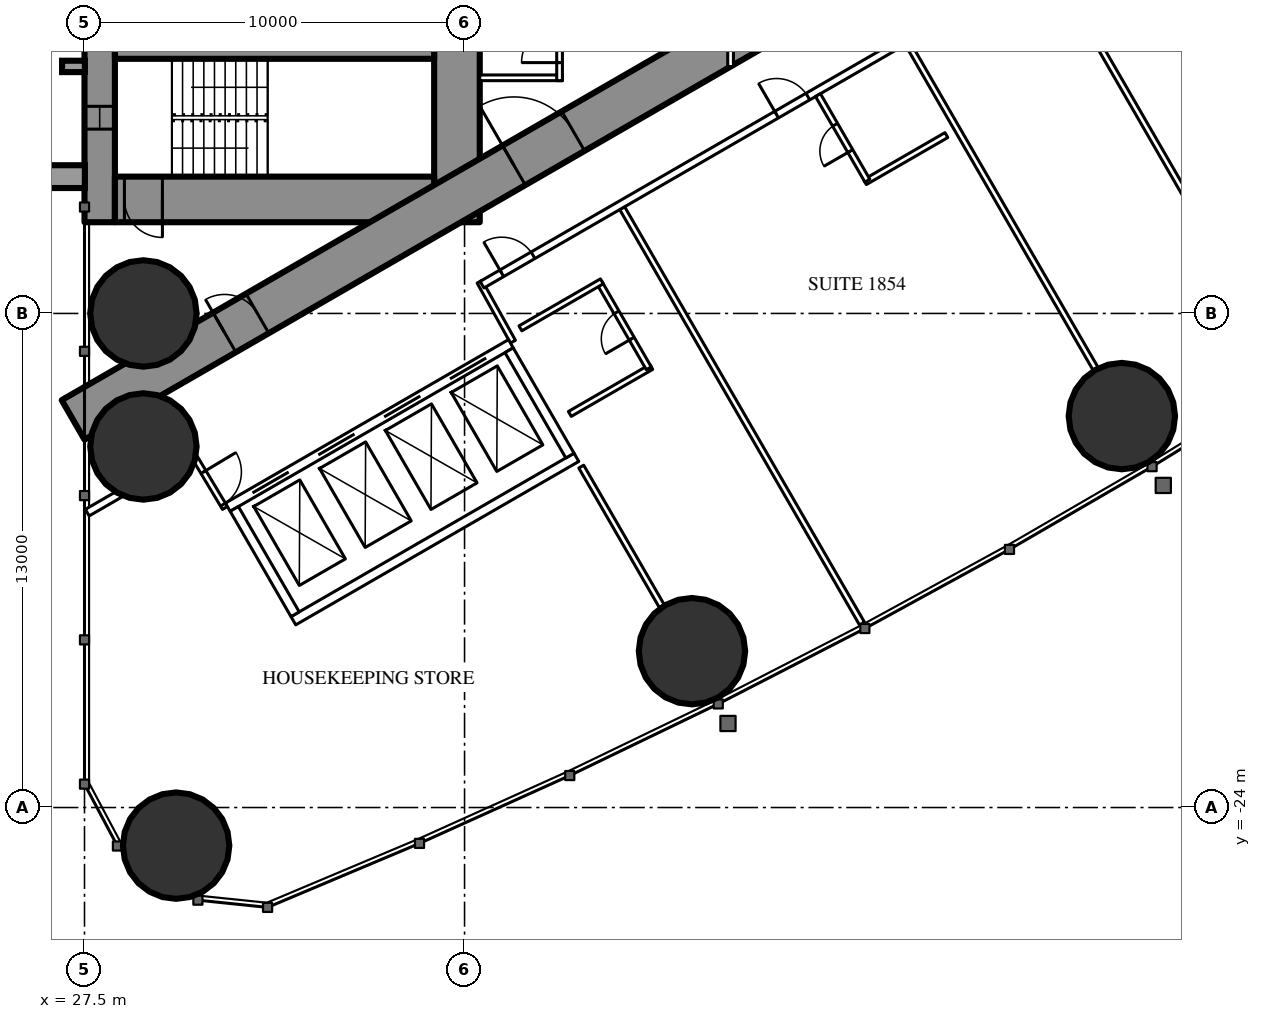
"""IFC4 building model, lengths in metres.
Left out: names, types, materials, properties, quantities, classifications, styles, units other than length and angle.
Written with IfcOpenShell. Run it as: python <this file> out.ifc"""

import sys

from ifc_helpers import new_model, si_unit, direction, frame, frame_2d, origin, origin_2d, place, context, subcontext, project, spatial, rectangle, hollow_circle, extrude, element, fill, save


model = new_model("IFC4")
c1 = context("Model", 3, precision=1e-05, world=origin(), true_north=direction((0.0, 1.0)))
c2 = subcontext(c1, "Body", "Model", "MODEL_VIEW")
j1 = project(units=[si_unit("LENGTHUNIT", "METRE"), si_unit("PLANEANGLEUNIT", "RADIAN")], contexts=[c1])
p1 = place(None, origin())
s1 = spatial("IfcSite", under=j1, at=p1, CompositionType="ELEMENT")
p2 = place(p1, origin())
s2 = spatial("IfcBuilding", under=s1, at=p2, CompositionType="ELEMENT")
p3 = place(p2, frame((0.0, 0.0, 70.5)))
s3 = spatial("IfcBuildingStorey", under=s2, at=p3, CompositionType="ELEMENT", Elevation=70.5)
for number, where, z_axis, x_axis in (
    (1, (29.911, -25.002, 0.0), (0.0, 0.0, 1.0), (1.0, 0.0, 0.0)),
    (2, (29.05, -11.0, 0.0), (0.0, 0.0, 1.0), (1.0, 0.0, 0.0)),
    (3, (29.05, -14.5, 0.0), (0.0, 0.0, 1.0), (1.0, 0.0, 0.0)),
    (4, (43.484, -19.886, 0.0), (0.0, 0.0, 1.0), (1.0, 0.0, 0.0)),
    (5, (54.795, -13.701, 0.0), (0.0, 0.0, 1.0), (1.0, 0.0, 0.0)),
):
    element("IfcColumn", number, at=place(p3, frame(where, z_axis=z_axis, x_axis=x_axis)), inside=s3, PredefinedType="COLUMN", context=c2, shape_type="SweptSolid", body=[
        extrude(hollow_circle(Radius=1.4, WallThickness=0.12, at=origin_2d()), origin(), (0.0, 0.0, 1.0), 3.5),
    ])
p4 = place(p3, frame((27.9, -8.6, 0.0), z_axis=(0.0, 0.0, 1.0), x_axis=(0.0, 1.0, 0.0)))
e6 = element("IfcWall", 6, at=p4, inside=s3, PredefinedType="SHEAR", context=c2, shape_type="SweptSolid", body=[
    extrude(rectangle(XDim=17.2, YDim=0.8, at=frame_2d((8.6, 0.0))), origin(), (0.0, 0.0, 1.0), 3.5),
])
p5 = place(p4, frame((2.45, 0.0, 0.6)))
e7 = element("IfcOpeningElement", 7, at=p5, cuts=e6, PredefinedType="OPENING", context=c2, shape_type="SweptSolid", body=[
    extrude(rectangle(XDim=0.6, YDim=2.1, at=frame_2d((0.3, 1.05))), frame((0.0, 0.41, 0.0), z_axis=(0.0, -1.0, 0.0), x_axis=(1.0, 0.0, 0.0)), (0.0, 0.0, 1.0), 0.82),
])
p6 = place(p4, frame((14.15, 0.0, 0.6)))
e8 = element("IfcOpeningElement", 8, at=p6, cuts=e6, PredefinedType="OPENING", context=c2, shape_type="SweptSolid", body=[
    extrude(rectangle(XDim=0.6, YDim=2.1, at=frame_2d((0.3, 1.05))), frame((0.0, 0.41, 0.0), z_axis=(0.0, -1.0, 0.0), x_axis=(1.0, 0.0, 0.0)), (0.0, 0.0, 1.0), 0.82),
])
p7 = place(p3, frame((37.3, -8.6, 0.0), z_axis=(0.0, 0.0, 1.0), x_axis=(0.0, 1.0, 0.0)))
e9 = element("IfcWall", 9, at=p7, inside=s3, PredefinedType="SHEAR", context=c2, shape_type="SweptSolid", body=[
    extrude(rectangle(XDim=17.2, YDim=1.2, at=frame_2d((8.6, 0.0))), origin(), (0.0, 0.0, 1.0), 3.5),
])
p8 = place(p7, frame((7.7, 0.0, 0.0)))
e10 = element("IfcOpeningElement", 10, at=p8, cuts=e9, PredefinedType="OPENING", context=c2, shape_type="SweptSolid", body=[
    extrude(rectangle(XDim=1.8, YDim=2.2, at=frame_2d((0.9, 1.1))), frame((0.0, 0.61, 0.0), z_axis=(0.0, -1.0, 0.0), x_axis=(1.0, 0.0, 0.0)), (0.0, 0.0, 1.0), 1.22),
])
p9 = place(p3, frame((28.3, -8.0, 0.0), z_axis=(0.0, 0.0, 1.0), x_axis=(1.0, 0.0, 0.0)))
e11 = element("IfcWall", 11, at=p9, inside=s3, PredefinedType="SHEAR", context=c2, shape_type="SweptSolid", body=[
    extrude(rectangle(XDim=8.4, YDim=1.2, at=frame_2d((4.2, 0.0))), origin(), (0.0, 0.0, 1.0), 3.5),
])
p10 = place(p9, frame((0.25, 0.0, 0.0)))
e12 = element("IfcOpeningElement", 12, at=p10, cuts=e11, PredefinedType="OPENING", context=c2, shape_type="SweptSolid", body=[
    extrude(rectangle(XDim=1.0, YDim=2.2, at=frame_2d((0.5, 1.1))), frame((0.0, 0.61, 0.0), z_axis=(0.0, -1.0, 0.0), x_axis=(1.0, 0.0, 0.0)), (0.0, 0.0, 1.0), 1.22),
])
p11 = place(p3, frame((28.3, -4.15, 0.0), z_axis=(0.0, 0.0, 1.0), x_axis=(1.0, 0.0, 0.0)))
e13 = element("IfcWall", 13, at=p11, inside=s3, PredefinedType="SHEAR", context=c2, shape_type="SweptSolid", body=[
    extrude(rectangle(XDim=8.4, YDim=0.3, at=frame_2d((4.2, 0.0))), origin(), (0.0, 0.0, 1.0), 3.5),
])
p12 = place(p3, frame((27.2, -13.8, 0.0), z_axis=(0.0, 0.0, 1.0), x_axis=(0.866027159892, 0.499996958321, 0.0)))
e14 = element("IfcWall", 14, at=p12, inside=s3, PredefinedType="SHEAR", context=c2, shape_type="SweptSolid", body=[
    extrude(rectangle(XDim=27.947, YDim=1.2, at=frame_2d((13.973, 0.0))), origin(), (0.0, 0.0, 1.0), 3.5),
])
p13 = place(p12, frame((4.6, 0.0, 0.0)))
e15 = element("IfcOpeningElement", 15, at=p13, cuts=e14, PredefinedType="OPENING", context=c2, shape_type="SweptSolid", body=[
    extrude(rectangle(XDim=1.0, YDim=2.2, at=frame_2d((0.5, 1.1))), frame((0.0, 0.61, 0.0), z_axis=(0.0, -1.0, 0.0), x_axis=(1.0, 0.0, 0.0)), (0.0, 0.0, 1.0), 1.22),
])
p14 = place(p12, frame((13.395, 0.0, 0.0)))
e16 = element("IfcOpeningElement", 16, at=p14, cuts=e14, PredefinedType="OPENING", context=c2, shape_type="SweptSolid", body=[
    extrude(rectangle(XDim=1.8, YDim=2.2, at=frame_2d((0.9, 1.1))), frame((0.0, 0.61, 0.0), z_axis=(0.0, -1.0, 0.0), x_axis=(1.0, 0.0, 0.0)), (0.0, 0.0, 1.0), 1.22),
])
p15 = place(p3, frame((41.647, -8.23, 0.0), z_axis=(0.0, 0.0, 1.0), x_axis=(0.49998590462, -0.866033541603, 0.0)))
e17 = element("IfcWall", 17, at=p15, inside=s3, PredefinedType="PARTITIONING", context=c2, shape_type="SweptSolid", body=[
    extrude(rectangle(XDim=12.621, YDim=0.15, at=frame_2d((6.311, 0.0))), origin(), (0.0, 0.0, 1.0), 3.25),
])
p16 = place(p3, frame((49.159, -3.893, 0.0), z_axis=(0.0, 0.0, 1.0), x_axis=(0.499998773722, -0.866026111775, 0.0)))
e18 = element("IfcWall", 18, at=p16, inside=s3, PredefinedType="PARTITIONING", context=c2, shape_type="SweptSolid", body=[
    extrude(rectangle(XDim=9.892, YDim=0.15, at=frame_2d((4.946, 0.0))), origin(), (0.0, 0.0, 1.0), 2.25),
])
p17 = place(p3, frame((52.915, -1.725, 0.0), z_axis=(0.0, 0.0, 1.0), x_axis=(0.499997163113, -0.866027041656, 0.0)))
e19 = element("IfcWall", 19, at=p17, inside=s3, PredefinedType="PARTITIONING", context=c2, shape_type="SweptSolid", body=[
    extrude(rectangle(XDim=12.591, YDim=0.15, at=frame_2d((6.295, 0.0))), origin(), (0.0, 0.0, 1.0), 3.25),
])
p18 = place(p3, frame((40.57, -15.03, 0.0), z_axis=(0.0, 0.0, 1.0), x_axis=(0.500012993597, -0.866017901798, 0.0)))
e20 = element("IfcWall", 20, at=p18, inside=s3, PredefinedType="PARTITIONING", context=c2, shape_type="SweptSolid", body=[
    extrude(rectangle(XDim=4.243, YDim=0.15, at=frame_2d((2.122, 0.0))), origin(), (0.0, 0.0, 1.0), 3.25),
])
p19 = place(p3, frame((27.572, -16.241, 0.0), z_axis=(0.0, 0.0, 1.0), x_axis=(0.866029654818, 0.499992636921, 0.0)))
e21 = element("IfcWall", 21, at=p19, inside=s3, PredefinedType="PARTITIONING", context=c2, shape_type="SweptSolid", body=[
    extrude(rectangle(XDim=3.155, YDim=0.2, at=frame_2d((1.577, 0.0))), origin(), (0.0, 0.0, 1.0), 3.25),
])
p20 = place(p3, frame((38.773, -11.742, 0.0), z_axis=(0.0, 0.0, 1.0), x_axis=(-0.485528096672, 0.8742210632, 0.0)))
e22 = element("IfcWall", 22, at=p20, inside=s3, PredefinedType="PARTITIONING", context=c2, shape_type="SweptSolid", body=[
    extrude(rectangle(XDim=1.805, YDim=0.15, at=frame_2d((0.903, 0.0))), origin(), (0.0, 0.0, 1.0), 3.25),
])
p21 = place(p3, frame((30.267, -14.569, 0.0), z_axis=(0.0, 0.0, 1.0), x_axis=(0.514336634837, -0.857588377991, 0.0)))
e23 = element("IfcWall", 23, at=p21, inside=s3, PredefinedType="PARTITIONING", context=c2, shape_type="SweptSolid", body=[
    extrude(rectangle(XDim=1.805, YDim=0.15, at=frame_2d((0.903, 0.0))), origin(), (0.0, 0.0, 1.0), 3.25),
])
p22 = place(p21, frame((0.703, 0.0, 0.0)))
e24 = element("IfcOpeningElement", 24, at=p22, cuts=e23, PredefinedType="OPENING", context=c2, shape_type="SweptSolid", body=[
    extrude(rectangle(XDim=1.0, YDim=2.2, at=frame_2d((0.5, 1.1))), frame((0.0, 0.085, 0.0), z_axis=(0.0, -1.0, 0.0), x_axis=(1.0, 0.0, 0.0)), (0.0, 0.0, 1.0), 0.17),
])
p23 = place(p3, frame((37.96, -10.243, 0.0), z_axis=(0.0, 0.0, 1.0), x_axis=(0.866030548046, 0.499991089772, 0.0)))
e25 = element("IfcWall", 25, at=p23, inside=s3, PredefinedType="PARTITIONING", context=c2, shape_type="SweptSolid", body=[
    extrude(rectangle(XDim=12.849, YDim=0.2, at=frame_2d((6.425, 0.0))), origin(), (0.0, 0.0, 1.0), 3.25),
])
p24 = place(p23, frame((8.949, 0.0, 0.0)))
e26 = element("IfcOpeningElement", 26, at=p24, cuts=e25, PredefinedType="OPENING", context=c2, shape_type="SweptSolid", body=[
    extrude(rectangle(XDim=0.95, YDim=2.2, at=frame_2d((0.475, 1.1))), frame((0.0, 0.11, 0.0), z_axis=(0.0, -1.0, 0.0), x_axis=(1.0, 0.0, 0.0)), (0.0, 0.0, 1.0), 0.22),
])
p25 = place(p23, frame((0.6, 0.0, 0.0)))
e27 = element("IfcOpeningElement", 27, at=p25, cuts=e25, PredefinedType="OPENING", context=c2, shape_type="SweptSolid", body=[
    extrude(rectangle(XDim=0.95, YDim=2.2, at=frame_2d((0.475, 1.1))), frame((0.0, 0.11, 0.0), z_axis=(0.0, -1.0, 0.0), x_axis=(1.0, 0.0, 0.0)), (0.0, 0.0, 1.0), 0.22),
])
p26 = place(p3, frame((48.035, -7.545, 0.0), z_axis=(0.0, 0.0, 1.0), x_axis=(0.866006523861, 0.500032699561, 0.0)))
e28 = element("IfcWall", 28, at=p26, inside=s3, PredefinedType="PARTITIONING", context=c2, shape_type="SweptSolid", body=[
    extrude(rectangle(XDim=2.475, YDim=0.15, at=frame_2d((1.237, 0.0))), origin(), (0.0, 0.0, 1.0), 3.25),
])
p27 = place(p3, frame((46.8, -5.255, 0.0), z_axis=(0.0, 0.0, 1.0), x_axis=(0.500006934395, -0.866021400173, 0.0)))
e29 = element("IfcWall", 29, at=p27, inside=s3, PredefinedType="PARTITIONING", context=c2, shape_type="SweptSolid", body=[
    extrude(rectangle(XDim=2.6, YDim=0.15, at=frame_2d((1.3, 0.0))), origin(), (0.0, 0.0, 1.0), 3.25),
])
p28 = place(p27, frame((0.9, 0.0, 0.0)))
e30 = element("IfcOpeningElement", 30, at=p28, cuts=e29, PredefinedType="OPENING", context=c2, shape_type="SweptSolid", body=[
    extrude(rectangle(XDim=0.8, YDim=2.2, at=frame_2d((0.4, 1.1))), frame((0.0, 0.085, 0.0), z_axis=(0.0, -1.0, 0.0), x_axis=(1.0, 0.0, 0.0)), (0.0, 0.0, 1.0), 0.17),
])
p29 = place(p3, frame((40.27, -13.644, 0.0), z_axis=(0.0, 0.0, 1.0), x_axis=(0.866031185235, 0.4999899861, 0.0)))
e31 = element("IfcWall", 31, at=p29, inside=s3, PredefinedType="PARTITIONING", context=c2, shape_type="SweptSolid", body=[
    extrude(rectangle(XDim=2.475, YDim=0.15, at=frame_2d((1.238, 0.0))), origin(), (0.0, 0.0, 1.0), 3.25),
])
p30 = place(p3, frame((41.048, -10.193, 0.0), z_axis=(0.0, 0.0, 1.0), x_axis=(0.500047596559, -0.865997922154, 0.0)))
e32 = element("IfcWall", 32, at=p30, inside=s3, PredefinedType="PARTITIONING", context=c2, shape_type="SweptSolid", body=[
    extrude(rectangle(XDim=2.6, YDim=0.15, at=frame_2d((1.3, 0.0))), origin(), (0.0, 0.0, 1.0), 3.25),
])
p31 = place(p30, frame((0.9, 0.0, 0.0)))
e33 = element("IfcOpeningElement", 33, at=p31, cuts=e32, PredefinedType="OPENING", context=c2, shape_type="SweptSolid", body=[
    extrude(rectangle(XDim=0.8, YDim=2.2, at=frame_2d((0.4, 1.1))), frame((0.0, 0.085, 0.0), z_axis=(0.0, -1.0, 0.0), x_axis=(1.0, 0.0, 0.0)), (0.0, 0.0, 1.0), 0.17),
])
p32 = place(p3, frame((38.97, -11.393, 0.0), z_axis=(0.0, 0.0, 1.0), x_axis=(0.866031185235, 0.4999899861, 0.0)))
e34 = element("IfcWall", 34, at=p32, inside=s3, PredefinedType="PARTITIONING", context=c2, shape_type="SweptSolid", body=[
    extrude(rectangle(XDim=2.475, YDim=0.15, at=frame_2d((1.238, 0.0))), origin(), (0.0, 0.0, 1.0), 3.25),
])
p33 = place(p3, frame((37.9, -4.8, 0.0), z_axis=(0.0, 0.0, 1.0), x_axis=(1.0, 0.0, 0.0)))
e35 = element("IfcWall", 35, at=p33, inside=s3, PredefinedType="PARTITIONING", context=c2, shape_type="SweptSolid", body=[
    extrude(rectangle(XDim=2.175, YDim=0.15, at=frame_2d((1.087, 0.0))), origin(), (0.0, 0.0, 1.0), 3.25),
])
p34 = place(p3, frame((40.0, -4.875, 0.0), z_axis=(0.0, 0.0, 1.0), x_axis=(0.0, 1.0, 0.0)))
e36 = element("IfcWall", 36, at=p34, inside=s3, PredefinedType="PARTITIONING", context=c2, shape_type="SweptSolid", body=[
    extrude(rectangle(XDim=1.95, YDim=0.15, at=frame_2d((0.975, 0.0))), origin(), (0.0, 0.0, 1.0), 3.25),
])
p35 = place(p34, frame((0.475, 0.0, 0.0)))
e37 = element("IfcOpeningElement", 37, at=p35, cuts=e36, PredefinedType="OPENING", context=c2, shape_type="SweptSolid", body=[
    extrude(rectangle(XDim=1.0, YDim=2.2, at=frame_2d((0.5, 1.1))), frame((0.0, 0.085, 0.0), z_axis=(0.0, -1.0, 0.0), x_axis=(1.0, 0.0, 0.0)), (0.0, 0.0, 1.0), 0.17),
])
p36 = place(p3, frame((44.5, -4.505, 0.0), z_axis=(0.0, 0.0, 1.0), x_axis=(0.0, 1.0, 0.0)))
e38 = element("IfcWall", 38, at=p36, inside=s3, PredefinedType="PARTITIONING", context=c2, shape_type="SweptSolid", body=[
    extrude(rectangle(XDim=9.009, YDim=0.15, at=frame_2d((4.505, 0.0))), origin(), (0.0, 0.0, 1.0), 2.45),
])
p37 = place(p36, frame((1.752, 0.0, 0.0)))
e39 = element("IfcOpeningElement", 39, at=p37, cuts=e38, PredefinedType="OPENING", context=c2, shape_type="SweptSolid", body=[
    extrude(rectangle(XDim=1.0, YDim=2.2, at=frame_2d((0.5, 1.1))), frame((0.0, 0.085, 0.0), z_axis=(0.0, -1.0, 0.0), x_axis=(1.0, 0.0, 0.0)), (0.0, 0.0, 1.0), 0.17),
])
p38 = place(p36, frame((6.257, 0.0, 0.0)))
e40 = element("IfcOpeningElement", 40, at=p38, cuts=e38, PredefinedType="OPENING", context=c2, shape_type="SweptSolid", body=[
    extrude(rectangle(XDim=1.0, YDim=2.2, at=frame_2d((0.5, 1.1))), frame((0.0, 0.085, 0.0), z_axis=(0.0, -1.0, 0.0), x_axis=(1.0, 0.0, 0.0)), (0.0, 0.0, 1.0), 0.17),
])
p39 = place(p3, frame((31.271, -16.097, 0.0), z_axis=(0.0, 0.0, 1.0), x_axis=(0.86604045752, 0.499973925258, 0.0)))
e41 = element("IfcWall", 41, at=p39, inside=s3, PredefinedType="PARTITIONING", context=c2, shape_type="SweptSolid", body=[
    extrude(rectangle(XDim=8.6, YDim=0.25, at=frame_2d((4.3, 0.0))), origin(), (0.0, 0.0, 1.0), 3.25),
])
p40 = place(p39, frame((0.75, 0.0, 0.0)))
e42 = element("IfcOpeningElement", 42, at=p40, cuts=e41, PredefinedType="OPENING", context=c2, shape_type="SweptSolid", body=[
    extrude(rectangle(XDim=1.1, YDim=2.2, at=frame_2d((0.55, 1.1))), frame((0.0, 0.135, 0.0), z_axis=(0.0, -1.0, 0.0), x_axis=(1.0, 0.0, 0.0)), (0.0, 0.0, 1.0), 0.27),
])
p41 = place(p39, frame((2.75, 0.0, 0.0)))
e43 = element("IfcOpeningElement", 43, at=p41, cuts=e41, PredefinedType="OPENING", context=c2, shape_type="SweptSolid", body=[
    extrude(rectangle(XDim=1.1, YDim=2.2, at=frame_2d((0.55, 1.1))), frame((0.0, 0.135, 0.0), z_axis=(0.0, -1.0, 0.0), x_axis=(1.0, 0.0, 0.0)), (0.0, 0.0, 1.0), 0.27),
])
p42 = place(p39, frame((4.75, 0.0, 0.0)))
e44 = element("IfcOpeningElement", 44, at=p42, cuts=e41, PredefinedType="OPENING", context=c2, shape_type="SweptSolid", body=[
    extrude(rectangle(XDim=1.1, YDim=2.2, at=frame_2d((0.55, 1.1))), frame((0.0, 0.135, 0.0), z_axis=(0.0, -1.0, 0.0), x_axis=(1.0, 0.0, 0.0)), (0.0, 0.0, 1.0), 0.27),
])
p43 = place(p39, frame((6.75, 0.0, 0.0)))
e45 = element("IfcOpeningElement", 45, at=p43, cuts=e41, PredefinedType="OPENING", context=c2, shape_type="SweptSolid", body=[
    extrude(rectangle(XDim=1.1, YDim=2.2, at=frame_2d((0.55, 1.1))), frame((0.0, 0.135, 0.0), z_axis=(0.0, -1.0, 0.0), x_axis=(1.0, 0.0, 0.0)), (0.0, 0.0, 1.0), 0.27),
])
p44 = place(p3, frame((32.996, -19.086, 0.0), z_axis=(0.0, 0.0, 1.0), x_axis=(0.866028165386, 0.499995216735, 0.0)))
e46 = element("IfcWall", 46, at=p44, inside=s3, PredefinedType="PARTITIONING", context=c2, shape_type="SweptSolid", body=[
    extrude(rectangle(XDim=8.6, YDim=0.25, at=frame_2d((4.3, 0.0))), origin(), (0.0, 0.0, 1.0), 3.25),
])
for number, where, z_axis, x_axis in (
    (47, (31.441, -16.143, 0.0), (0.0, 0.0, 1.0), (0.5, -0.866, 0.0)),
    (48, (38.673, -11.968, 0.0), (0.0, 0.0, 1.0), (0.5, -0.866, 0.0)),
):
    element("IfcWall", number, at=place(p3, frame(where, z_axis=z_axis, x_axis=x_axis)), inside=s3, PredefinedType="PARTITIONING", context=c2, shape_type="SweptSolid", body=[
        extrude(rectangle(XDim=3.201, YDim=0.25, at=frame_2d((1.6, 0.0))), origin(), (0.0, 0.0, 1.0), 3.25),
    ])
p45 = place(p28, origin())
e49 = element("IfcDoor", 49, at=p45, inside=s3, OperationType="SINGLE_SWING_RIGHT", PredefinedType="DOOR", context=c2, shape_type="SweptSolid", body=[
    extrude(rectangle(XDim=0.8, YDim=2.2, at=frame_2d((0.4, 1.1))), frame((0.0, 0.025, 0.0), z_axis=(0.0, -1.0, 0.0), x_axis=(1.0, 0.0, 0.0)), (0.0, 0.0, 1.0), 0.05),
])
fill(e30, e49)
p46 = place(p24, origin())
e50 = element("IfcDoor", 50, at=p46, inside=s3, OperationType="SINGLE_SWING_LEFT", PredefinedType="DOOR", context=c2, shape_type="SweptSolid", body=[
    extrude(rectangle(XDim=0.95, YDim=2.2, at=frame_2d((0.475, 1.1))), frame((0.0, 0.025, 0.0), z_axis=(0.0, -1.0, 0.0), x_axis=(1.0, 0.0, 0.0)), (0.0, 0.0, 1.0), 0.05),
])
fill(e26, e50)
p47 = place(p31, origin())
e51 = element("IfcDoor", 51, at=p47, inside=s3, OperationType="SINGLE_SWING_RIGHT", PredefinedType="DOOR", context=c2, shape_type="SweptSolid", body=[
    extrude(rectangle(XDim=0.8, YDim=2.2, at=frame_2d((0.4, 1.1))), frame((0.0, 0.025, 0.0), z_axis=(0.0, -1.0, 0.0), x_axis=(1.0, 0.0, 0.0)), (0.0, 0.0, 1.0), 0.05),
])
fill(e33, e51)
p48 = place(p25, origin())
e52 = element("IfcDoor", 52, at=p48, inside=s3, OperationType="SINGLE_SWING_LEFT", PredefinedType="DOOR", context=c2, shape_type="SweptSolid", body=[
    extrude(rectangle(XDim=0.95, YDim=2.2, at=frame_2d((0.475, 1.1))), frame((0.0, 0.025, 0.0), z_axis=(0.0, -1.0, 0.0), x_axis=(1.0, 0.0, 0.0)), (0.0, 0.0, 1.0), 0.05),
])
fill(e27, e52)
p49 = place(p22, origin())
e53 = element("IfcDoor", 53, at=p49, inside=s3, OperationType="SINGLE_SWING_LEFT", PredefinedType="DOOR", context=c2, shape_type="SweptSolid", body=[
    extrude(rectangle(XDim=1.0, YDim=2.2, at=frame_2d((0.5, 1.1))), frame((0.0, 0.025, 0.0), z_axis=(0.0, -1.0, 0.0), x_axis=(1.0, 0.0, 0.0)), (0.0, 0.0, 1.0), 0.05),
])
fill(e24, e53)
p50 = place(p35, origin())
e54 = element("IfcDoor", 54, at=p50, inside=s3, OperationType="SINGLE_SWING_LEFT", PredefinedType="DOOR", context=c2, shape_type="SweptSolid", body=[
    extrude(rectangle(XDim=1.0, YDim=2.2, at=frame_2d((0.5, 1.1))), frame((0.0, 0.025, 0.0), z_axis=(0.0, -1.0, 0.0), x_axis=(1.0, 0.0, 0.0)), (0.0, 0.0, 1.0), 0.05),
])
fill(e37, e54)
p51 = place(p13, origin())
e55 = element("IfcDoor", 55, at=p51, inside=s3, OperationType="SINGLE_SWING_LEFT", PredefinedType="DOOR", context=c2, shape_type="SweptSolid", body=[
    extrude(rectangle(XDim=1.0, YDim=2.2, at=frame_2d((0.5, 1.1))), frame((0.0, 0.025, 0.0), z_axis=(0.0, -1.0, 0.0), x_axis=(1.0, 0.0, 0.0)), (0.0, 0.0, 1.0), 0.05),
])
fill(e15, e55)
p52 = place(p14, origin())
e56 = element("IfcDoor", 56, at=p52, inside=s3, OperationType="DOUBLE_DOOR_SINGLE_SWING", PredefinedType="DOOR", context=c2, shape_type="SweptSolid", body=[
    extrude(rectangle(XDim=1.8, YDim=2.2, at=frame_2d((0.9, 1.1))), frame((0.0, 0.025, 0.0), z_axis=(0.0, -1.0, 0.0), x_axis=(1.0, 0.0, 0.0)), (0.0, 0.0, 1.0), 0.05),
])
fill(e16, e56)
p53 = place(p10, origin())
e57 = element("IfcDoor", 57, at=p53, inside=s3, OperationType="SINGLE_SWING_RIGHT", PredefinedType="DOOR", context=c2, shape_type="SweptSolid", body=[
    extrude(rectangle(XDim=1.0, YDim=2.2, at=frame_2d((0.5, 1.1))), frame((0.0, 0.025, 0.0), z_axis=(0.0, -1.0, 0.0), x_axis=(1.0, 0.0, 0.0)), (0.0, 0.0, 1.0), 0.05),
])
fill(e12, e57)
p54 = place(p40, origin())
e58 = element("IfcDoor", 58, at=p54, inside=s3, OperationType="DOUBLE_DOOR_SLIDING", PredefinedType="USERDEFINED", context=c2, shape_type="SweptSolid", body=[
    extrude(rectangle(XDim=1.1, YDim=2.2, at=frame_2d((0.55, 1.1))), frame((0.0, 0.025, 0.0), z_axis=(0.0, -1.0, 0.0), x_axis=(1.0, 0.0, 0.0)), (0.0, 0.0, 1.0), 0.05),
])
fill(e42, e58)
p55 = place(p41, origin())
e59 = element("IfcDoor", 59, at=p55, inside=s3, OperationType="DOUBLE_DOOR_SLIDING", PredefinedType="USERDEFINED", context=c2, shape_type="SweptSolid", body=[
    extrude(rectangle(XDim=1.1, YDim=2.2, at=frame_2d((0.55, 1.1))), frame((0.0, 0.025, 0.0), z_axis=(0.0, -1.0, 0.0), x_axis=(1.0, 0.0, 0.0)), (0.0, 0.0, 1.0), 0.05),
])
fill(e43, e59)
p56 = place(p42, origin())
e60 = element("IfcDoor", 60, at=p56, inside=s3, OperationType="DOUBLE_DOOR_SLIDING", PredefinedType="USERDEFINED", context=c2, shape_type="SweptSolid", body=[
    extrude(rectangle(XDim=1.1, YDim=2.2, at=frame_2d((0.55, 1.1))), frame((0.0, 0.025, 0.0), z_axis=(0.0, -1.0, 0.0), x_axis=(1.0, 0.0, 0.0)), (0.0, 0.0, 1.0), 0.05),
])
fill(e44, e60)
p57 = place(p43, origin())
e61 = element("IfcDoor", 61, at=p57, inside=s3, OperationType="DOUBLE_DOOR_SLIDING", PredefinedType="USERDEFINED", context=c2, shape_type="SweptSolid", body=[
    extrude(rectangle(XDim=1.1, YDim=2.2, at=frame_2d((0.55, 1.1))), frame((0.0, 0.025, 0.0), z_axis=(0.0, -1.0, 0.0), x_axis=(1.0, 0.0, 0.0)), (0.0, 0.0, 1.0), 0.05),
])
fill(e45, e61)
p58 = place(p5, origin())
e62 = element("IfcWindow", 62, at=p58, inside=s3, PartitioningType="SINGLE_PANEL", PredefinedType="WINDOW", context=c2, shape_type="SweptSolid", body=[
    extrude(rectangle(XDim=0.6, YDim=2.1, at=frame_2d((0.3, 1.05))), frame((0.0, 0.03, 0.0), z_axis=(0.0, -1.0, 0.0), x_axis=(1.0, 0.0, 0.0)), (0.0, 0.0, 1.0), 0.06),
])
fill(e7, e62)
save(model, sys.argv[1])
